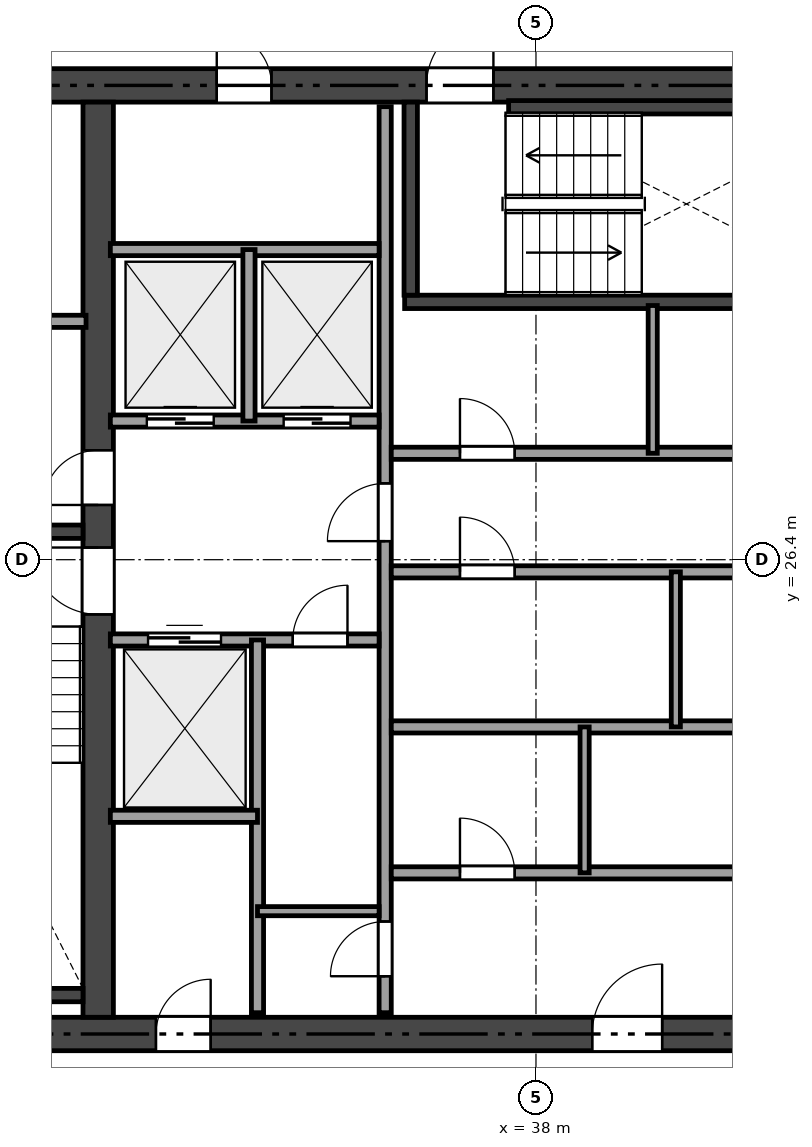
"""IFC4 building model, lengths in metres.
Left out: names, types, materials, properties, quantities, classifications, styles, units other than length and angle.
Written with IfcOpenShell. Run it as: python <this file> out.ifc"""

import sys

from ifc_helpers import new_model, si_unit, direction, frame, frame_2d, origin, place, context, subcontext, project, spatial, rectangle, extrude, element, fill, save


model = new_model("IFC4")
c1 = context("Model", 3, precision=1e-05, world=origin(), true_north=direction((0.0, 1.0)))
c2 = subcontext(c1, "Body", "Model", "MODEL_VIEW")
j1 = project(units=[si_unit("LENGTHUNIT", "METRE"), si_unit("PLANEANGLEUNIT", "RADIAN")], contexts=[c1])
p1 = place(None, origin())
s1 = spatial("IfcSite", under=j1, at=p1, CompositionType="ELEMENT")
p2 = place(p1, origin())
s2 = spatial("IfcBuilding", under=s1, at=p2, CompositionType="ELEMENT")
p3 = place(p2, frame((0.0, 0.0, 289.9)))
s3 = spatial("IfcBuildingStorey", under=s2, at=p3, CompositionType="ELEMENT", Elevation=289.9)
p4 = place(p3, frame((26.525, 18.6, 0.0), z_axis=(0.0, 0.0, 1.0), x_axis=(1.0, 0.0, 0.0)))
e1 = element("IfcWall", 1, at=p4, inside=s3, PredefinedType="SHEAR", context=c2, shape_type="SweptSolid", body=[
    extrude(rectangle(XDim=21.35, YDim=0.55, at=frame_2d((10.675, 0.0))), origin(), (0.0, 0.0, 1.0), 2.58),
])
p5 = place(p4, frame((12.4, 0.0, 0.0)))
e2 = element("IfcOpeningElement", 2, at=p5, cuts=e1, PredefinedType="OPENING", context=c2, shape_type="SweptSolid", body=[
    extrude(rectangle(XDim=1.15, YDim=2.15, at=frame_2d((0.575, 1.075))), frame((0.0, 0.285, 0.0), z_axis=(0.0, -1.0, 0.0), x_axis=(1.0, 0.0, 0.0)), (0.0, 0.0, 1.0), 0.57),
])
p6 = place(p4, frame((5.225, 0.0, 0.0)))
e3 = element("IfcOpeningElement", 3, at=p6, cuts=e1, PredefinedType="OPENING", context=c2, shape_type="SweptSolid", body=[
    extrude(rectangle(XDim=0.9, YDim=2.1, at=frame_2d((0.45, 1.05))), frame((0.0, 0.285, 0.0), z_axis=(0.0, -1.0, 0.0), x_axis=(1.0, 0.0, 0.0)), (0.0, 0.0, 1.0), 0.57),
])
p7 = place(p3, frame((26.525, 34.2, 0.0), z_axis=(0.0, 0.0, 1.0), x_axis=(1.0, 0.0, 0.0)))
e4 = element("IfcWall", 4, at=p7, inside=s3, PredefinedType="SHEAR", context=c2, shape_type="SweptSolid", body=[
    extrude(rectangle(XDim=21.35, YDim=0.55, at=frame_2d((10.675, 0.0))), origin(), (0.0, 0.0, 1.0), 2.58),
])
p8 = place(p7, frame((9.675, 0.0, 0.0)))
e5 = element("IfcOpeningElement", 5, at=p8, cuts=e4, PredefinedType="OPENING", context=c2, shape_type="SweptSolid", body=[
    extrude(rectangle(XDim=1.1, YDim=2.15, at=frame_2d((0.55, 1.075))), frame((0.0, 0.285, 0.0), z_axis=(0.0, -1.0, 0.0), x_axis=(1.0, 0.0, 0.0)), (0.0, 0.0, 1.0), 0.57),
])
p9 = place(p7, frame((1.925, 0.0, 0.0)))
e6 = element("IfcOpeningElement", 6, at=p9, cuts=e4, PredefinedType="OPENING", context=c2, shape_type="SweptSolid", body=[
    extrude(rectangle(XDim=0.9, YDim=2.1, at=frame_2d((0.45, 1.05))), frame((0.0, 0.285, 0.0), z_axis=(0.0, -1.0, 0.0), x_axis=(1.0, 0.0, 0.0)), (0.0, 0.0, 1.0), 0.57),
])
p10 = place(p7, frame((6.225, 0.0, 0.0)))
e7 = element("IfcOpeningElement", 7, at=p10, cuts=e4, PredefinedType="OPENING", context=c2, shape_type="SweptSolid", body=[
    extrude(rectangle(XDim=0.9, YDim=2.1, at=frame_2d((0.45, 1.05))), frame((0.0, 0.285, 0.0), z_axis=(0.0, -1.0, 0.0), x_axis=(1.0, 0.0, 0.0)), (0.0, 0.0, 1.0), 0.57),
])
p11 = place(p3, frame((30.8, 18.875, 0.0), z_axis=(0.0, 0.0, 1.0), x_axis=(0.0, 1.0, 0.0)))
e8 = element("IfcWall", 8, at=p11, inside=s3, PredefinedType="SHEAR", context=c2, shape_type="SweptSolid", body=[
    extrude(rectangle(XDim=15.05, YDim=0.5, at=frame_2d((7.525, 0.0))), origin(), (0.0, 0.0, 1.0), 2.58),
])
p12 = place(p11, frame((6.625, 0.0, 0.0)))
e9 = element("IfcOpeningElement", 9, at=p12, cuts=e8, PredefinedType="OPENING", context=c2, shape_type="SweptSolid", body=[
    extrude(rectangle(XDim=1.1, YDim=2.15, at=frame_2d((0.55, 1.075))), frame((0.0, 0.26, 0.0), z_axis=(0.0, -1.0, 0.0), x_axis=(1.0, 0.0, 0.0)), (0.0, 0.0, 1.0), 0.52),
])
p13 = place(p11, frame((8.425, 0.0, 0.0)))
e10 = element("IfcOpeningElement", 10, at=p13, cuts=e8, PredefinedType="OPENING", context=c2, shape_type="SweptSolid", body=[
    extrude(rectangle(XDim=0.9, YDim=2.1, at=frame_2d((0.45, 1.05))), frame((0.0, 0.26, 0.0), z_axis=(0.0, -1.0, 0.0), x_axis=(1.0, 0.0, 0.0)), (0.0, 0.0, 1.0), 0.52),
])
for number, where, z_axis, x_axis in (
    (11, (27.075, 26.86, 0.0), (0.0, 0.0, 1.0), (1.0, 0.0, 0.0)),
    (12, (27.075, 19.24, 0.0), (0.0, 0.0, 1.0), (1.0, 0.0, 0.0)),
):
    element("IfcWall", number, at=place(p3, frame(where, z_axis=z_axis, x_axis=x_axis)), inside=s3, PredefinedType="SHEAR", context=c2, shape_type="SweptSolid", body=[
        extrude(rectangle(XDim=3.475, YDim=0.22, at=frame_2d((1.738, 0.0))), origin(), (0.0, 0.0, 1.0), 2.58),
    ])
p14 = place(p3, frame((35.84, 30.64, 0.0), z_axis=(0.0, 0.0, 1.0), x_axis=(1.0, 0.0, 0.0)))
e13 = element("IfcWall", 13, at=p14, inside=s3, PredefinedType="SHEAR", context=c2, shape_type="SweptSolid", body=[
    extrude(rectangle(XDim=7.61, YDim=0.22, at=frame_2d((3.805, 0.0))), origin(), (0.0, 0.0, 1.0), 2.58),
])
p15 = place(p3, frame((35.94, 30.75, 0.0), z_axis=(0.0, 0.0, 1.0), x_axis=(0.0, 1.0, 0.0)))
e14 = element("IfcWall", 14, at=p15, inside=s3, PredefinedType="SHEAR", context=c2, shape_type="SweptSolid", body=[
    extrude(rectangle(XDim=3.175, YDim=0.22, at=frame_2d((1.587, 0.0))), origin(), (0.0, 0.0, 1.0), 2.58),
])
p16 = place(p3, frame((37.55, 33.84, 0.0), z_axis=(0.0, 0.0, 1.0), x_axis=(1.0, 0.0, 0.0)))
e15 = element("IfcWall", 15, at=p16, inside=s3, PredefinedType="SHEAR", context=c2, shape_type="SweptSolid", body=[
    extrude(rectangle(XDim=5.9, YDim=0.22, at=frame_2d((2.95, 0.0))), origin(), (0.0, 0.0, 1.0), 2.58),
])
p17 = place(p3, frame((27.15, 30.32, 0.0), z_axis=(0.0, 0.0, 1.0), x_axis=(1.0, 0.0, 0.0)))
e16 = element("IfcWall", 16, at=p17, inside=s3, PredefinedType="SOLIDWALL", context=c2, shape_type="SweptSolid", body=[
    extrude(rectangle(XDim=3.45, YDim=0.2, at=frame_2d((1.725, 0.0))), origin(), (0.0, 0.0, 1.0), 2.58),
])
p18 = place(p3, frame((35.52, 18.95, 0.0), z_axis=(0.0, 0.0, 1.0), x_axis=(0.0, 1.0, 0.0)))
e17 = element("IfcWall", 17, at=p18, inside=s3, PredefinedType="SOLIDWALL", context=c2, shape_type="SweptSolid", body=[
    extrude(rectangle(XDim=14.9, YDim=0.2, at=frame_2d((7.45, 0.0))), origin(), (0.0, 0.0, 1.0), 2.27),
])
p19 = place(p18, frame((7.755, 0.0, 0.0)))
e18 = element("IfcOpeningElement", 18, at=p19, cuts=e17, PredefinedType="OPENING", context=c2, shape_type="SweptSolid", body=[
    extrude(rectangle(XDim=0.95, YDim=2.15, at=frame_2d((0.475, 1.075))), frame((0.0, 0.11, 0.0), z_axis=(0.0, -1.0, 0.0), x_axis=(1.0, 0.0, 0.0)), (0.0, 0.0, 1.0), 0.22),
])
p20 = place(p18, frame((0.6, 0.0, 0.0)))
e19 = element("IfcOpeningElement", 19, at=p20, cuts=e17, PredefinedType="OPENING", context=c2, shape_type="SweptSolid", body=[
    extrude(rectangle(XDim=0.9, YDim=2.1, at=frame_2d((0.45, 1.05))), frame((0.0, 0.11, 0.0), z_axis=(0.0, -1.0, 0.0), x_axis=(1.0, 0.0, 0.0)), (0.0, 0.0, 1.0), 0.22),
])
p21 = place(p3, frame((31.0, 28.68, 0.0), z_axis=(0.0, 0.0, 1.0), x_axis=(1.0, 0.0, 0.0)))
e20 = element("IfcWall", 20, at=p21, inside=s3, PredefinedType="SOLIDWALL", context=c2, shape_type="SweptSolid", body=[
    extrude(rectangle(XDim=4.42, YDim=0.2, at=frame_2d((2.21, 0.0))), origin(), (0.0, 0.0, 1.0), 2.58),
])
p22 = place(p21, frame((0.6, 0.0, 0.0)))
e21 = element("IfcOpeningElement", 21, at=p22, cuts=e20, PredefinedType="OPENING", context=c2, shape_type="SweptSolid", body=[
    extrude(rectangle(XDim=1.1, YDim=2.15, at=frame_2d((0.55, 1.075))), frame((0.0, 0.11, 0.0), z_axis=(0.0, -1.0, 0.0), x_axis=(1.0, 0.0, 0.0)), (0.0, 0.0, 1.0), 0.22),
])
p23 = place(p21, frame((2.85, 0.0, 0.0)))
e22 = element("IfcOpeningElement", 22, at=p23, cuts=e20, PredefinedType="OPENING", context=c2, shape_type="SweptSolid", body=[
    extrude(rectangle(XDim=1.1, YDim=2.15, at=frame_2d((0.55, 1.075))), frame((0.0, 0.11, 0.0), z_axis=(0.0, -1.0, 0.0), x_axis=(1.0, 0.0, 0.0)), (0.0, 0.0, 1.0), 0.22),
])
p24 = place(p3, frame((31.0, 31.5, 0.0), z_axis=(0.0, 0.0, 1.0), x_axis=(1.0, 0.0, 0.0)))
e23 = element("IfcWall", 23, at=p24, inside=s3, PredefinedType="SOLIDWALL", context=c2, shape_type="SweptSolid", body=[
    extrude(rectangle(XDim=4.42, YDim=0.2, at=frame_2d((2.21, 0.0))), origin(), (0.0, 0.0, 1.0), 2.58),
])
p25 = place(p3, frame((33.28, 28.68, 0.0), z_axis=(0.0, 0.0, 1.0), x_axis=(0.0, 1.0, 0.0)))
e24 = element("IfcWall", 24, at=p25, inside=s3, PredefinedType="SOLIDWALL", context=c2, shape_type="SweptSolid", body=[
    extrude(rectangle(XDim=2.82, YDim=0.2, at=frame_2d((1.41, 0.0))), origin(), (0.0, 0.0, 1.0), 2.58),
])
p26 = place(p3, frame((31.0, 25.08, 0.0), z_axis=(0.0, 0.0, 1.0), x_axis=(1.0, 0.0, 0.0)))
e25 = element("IfcWall", 25, at=p26, inside=s3, PredefinedType="SOLIDWALL", context=c2, shape_type="SweptSolid", body=[
    extrude(rectangle(XDim=4.42, YDim=0.2, at=frame_2d((2.21, 0.0))), origin(), (0.0, 0.0, 1.0), 2.58),
])
p27 = place(p26, frame((3.0, 0.0, 0.0)))
e26 = element("IfcOpeningElement", 26, at=p27, cuts=e25, PredefinedType="OPENING", context=c2, shape_type="SweptSolid", body=[
    extrude(rectangle(XDim=0.9, YDim=2.1, at=frame_2d((0.45, 1.05))), frame((0.0, 0.11, 0.0), z_axis=(0.0, -1.0, 0.0), x_axis=(1.0, 0.0, 0.0)), (0.0, 0.0, 1.0), 0.22),
])
p28 = place(p26, frame((0.62, 0.0, 0.0)))
e27 = element("IfcOpeningElement", 27, at=p28, cuts=e25, PredefinedType="OPENING", context=c2, shape_type="SweptSolid", body=[
    extrude(rectangle(XDim=1.2, YDim=2.15, at=frame_2d((0.6, 1.075))), frame((0.0, 0.11, 0.0), z_axis=(0.0, -1.0, 0.0), x_axis=(1.0, 0.0, 0.0)), (0.0, 0.0, 1.0), 0.22),
])
p29 = place(p3, frame((33.42, 18.95, 0.0), z_axis=(0.0, 0.0, 1.0), x_axis=(0.0, 1.0, 0.0)))
e28 = element("IfcWall", 28, at=p29, inside=s3, PredefinedType="SOLIDWALL", context=c2, shape_type="SweptSolid", body=[
    extrude(rectangle(XDim=6.13, YDim=0.2, at=frame_2d((3.065, 0.0))), origin(), (0.0, 0.0, 1.0), 2.101),
])
p30 = place(p3, frame((31.0, 22.18, 0.0), z_axis=(0.0, 0.0, 1.0), x_axis=(1.0, 0.0, 0.0)))
e29 = element("IfcWall", 29, at=p30, inside=s3, PredefinedType="SOLIDWALL", context=c2, shape_type="SweptSolid", body=[
    extrude(rectangle(XDim=2.42, YDim=0.2, at=frame_2d((1.21, 0.0))), origin(), (0.0, 0.0, 1.0), 2.58),
])
p31 = place(p3, frame((33.42, 20.62, 0.0), z_axis=(0.0, 0.0, 1.0), x_axis=(1.0, 0.0, 0.0)))
e30 = element("IfcWall", 30, at=p31, inside=s3, PredefinedType="PARTITIONING", context=c2, shape_type="SweptSolid", body=[
    extrude(rectangle(XDim=2.0, YDim=0.15, at=frame_2d((1.0, 0.0))), origin(), (0.0, 0.0, 1.0), 2.58),
])
p32 = place(p3, frame((35.62, 28.15, 0.0), z_axis=(0.0, 0.0, 1.0), x_axis=(1.0, 0.0, 0.0)))
e31 = element("IfcWall", 31, at=p32, inside=s3, PredefinedType="SOLIDWALL", context=c2, shape_type="SweptSolid", body=[
    extrude(rectangle(XDim=7.88, YDim=0.2, at=frame_2d((3.94, 0.0))), origin(), (0.0, 0.0, 1.0), 2.58),
])
p33 = place(p32, frame((1.13, 0.0, 0.0)))
e32 = element("IfcOpeningElement", 32, at=p33, cuts=e31, PredefinedType="OPENING", context=c2, shape_type="SweptSolid", body=[
    extrude(rectangle(XDim=0.9, YDim=2.1, at=frame_2d((0.45, 1.05))), frame((0.0, 0.11, 0.0), z_axis=(0.0, -1.0, 0.0), x_axis=(1.0, 0.0, 0.0)), (0.0, 0.0, 1.0), 0.22),
])
p34 = place(p32, frame((5.73, 0.0, 0.0)))
e33 = element("IfcOpeningElement", 33, at=p34, cuts=e31, PredefinedType="OPENING", context=c2, shape_type="SweptSolid", body=[
    extrude(rectangle(XDim=0.9, YDim=2.1, at=frame_2d((0.45, 1.05))), frame((0.0, 0.11, 0.0), z_axis=(0.0, -1.0, 0.0), x_axis=(1.0, 0.0, 0.0)), (0.0, 0.0, 1.0), 0.22),
])
p35 = place(p3, frame((35.62, 26.2, 0.0), z_axis=(0.0, 0.0, 1.0), x_axis=(1.0, 0.0, 0.0)))
e34 = element("IfcWall", 34, at=p35, inside=s3, PredefinedType="SOLIDWALL", context=c2, shape_type="SweptSolid", body=[
    extrude(rectangle(XDim=7.88, YDim=0.2, at=frame_2d((3.94, 0.0))), origin(), (0.0, 0.0, 1.0), 2.58),
])
p36 = place(p35, frame((1.13, 0.0, 0.0)))
e35 = element("IfcOpeningElement", 35, at=p36, cuts=e34, PredefinedType="OPENING", context=c2, shape_type="SweptSolid", body=[
    extrude(rectangle(XDim=0.9, YDim=2.1, at=frame_2d((0.45, 1.05))), frame((0.0, 0.11, 0.0), z_axis=(0.0, -1.0, 0.0), x_axis=(1.0, 0.0, 0.0)), (0.0, 0.0, 1.0), 0.22),
])
p37 = place(p35, frame((5.73, 0.0, 0.0)))
e36 = element("IfcOpeningElement", 36, at=p37, cuts=e34, PredefinedType="OPENING", context=c2, shape_type="SweptSolid", body=[
    extrude(rectangle(XDim=0.9, YDim=2.1, at=frame_2d((0.45, 1.05))), frame((0.0, 0.11, 0.0), z_axis=(0.0, -1.0, 0.0), x_axis=(1.0, 0.0, 0.0)), (0.0, 0.0, 1.0), 0.22),
])
p38 = place(p3, frame((35.62, 23.65, 0.0), z_axis=(0.0, 0.0, 1.0), x_axis=(1.0, 0.0, 0.0)))
e37 = element("IfcWall", 37, at=p38, inside=s3, PredefinedType="SOLIDWALL", context=c2, shape_type="SweptSolid", body=[
    extrude(rectangle(XDim=7.88, YDim=0.2, at=frame_2d((3.94, 0.0))), origin(), (0.0, 0.0, 1.0), 2.101),
])
p39 = place(p3, frame((35.62, 21.25, 0.0), z_axis=(0.0, 0.0, 1.0), x_axis=(1.0, 0.0, 0.0)))
e38 = element("IfcWall", 38, at=p39, inside=s3, PredefinedType="SOLIDWALL", context=c2, shape_type="SweptSolid", body=[
    extrude(rectangle(XDim=7.88, YDim=0.2, at=frame_2d((3.94, 0.0))), origin(), (0.0, 0.0, 1.0), 2.58),
])
p40 = place(p39, frame((1.13, 0.0, 0.0)))
e39 = element("IfcOpeningElement", 39, at=p40, cuts=e38, PredefinedType="OPENING", context=c2, shape_type="SweptSolid", body=[
    extrude(rectangle(XDim=0.9, YDim=2.1, at=frame_2d((0.45, 1.05))), frame((0.0, 0.11, 0.0), z_axis=(0.0, -1.0, 0.0), x_axis=(1.0, 0.0, 0.0)), (0.0, 0.0, 1.0), 0.22),
])
p41 = place(p39, frame((5.73, 0.0, 0.0)))
e40 = element("IfcOpeningElement", 40, at=p41, cuts=e38, PredefinedType="OPENING", context=c2, shape_type="SweptSolid", body=[
    extrude(rectangle(XDim=0.9, YDim=2.1, at=frame_2d((0.45, 1.05))), frame((0.0, 0.11, 0.0), z_axis=(0.0, -1.0, 0.0), x_axis=(1.0, 0.0, 0.0)), (0.0, 0.0, 1.0), 0.22),
])
p42 = place(p3, frame((39.92, 28.15, 0.0), z_axis=(0.0, 0.0, 1.0), x_axis=(0.0, 1.0, 0.0)))
e41 = element("IfcWall", 41, at=p42, inside=s3, PredefinedType="PARTITIONING", context=c2, shape_type="SweptSolid", body=[
    extrude(rectangle(XDim=2.43, YDim=0.15, at=frame_2d((1.215, 0.0))), origin(), (0.0, 0.0, 1.0), 2.58),
])
p43 = place(p3, frame((40.3, 23.65, 0.0), z_axis=(0.0, 0.0, 1.0), x_axis=(0.0, 1.0, 0.0)))
e42 = element("IfcWall", 42, at=p43, inside=s3, PredefinedType="PARTITIONING", context=c2, shape_type="SweptSolid", body=[
    extrude(rectangle(XDim=2.55, YDim=0.15, at=frame_2d((1.275, 0.0))), origin(), (0.0, 0.0, 1.0), 2.101),
])
p44 = place(p3, frame((38.8, 21.25, 0.0), z_axis=(0.0, 0.0, 1.0), x_axis=(0.0, 1.0, 0.0)))
e43 = element("IfcWall", 43, at=p44, inside=s3, PredefinedType="PARTITIONING", context=c2, shape_type="SweptSolid", body=[
    extrude(rectangle(XDim=2.4, YDim=0.15, at=frame_2d((1.2, 0.0))), origin(), (0.0, 0.0, 1.0), 2.101),
])
p45 = place(p12, origin())
e44 = element("IfcDoor", 44, at=p45, inside=s3, OperationType="SINGLE_SWING_RIGHT", PredefinedType="DOOR", context=c2, shape_type="SweptSolid", body=[
    extrude(rectangle(XDim=1.1, YDim=2.15, at=frame_2d((0.55, 1.075))), frame((0.0, 0.025, 0.0), z_axis=(0.0, -1.0, 0.0), x_axis=(1.0, 0.0, 0.0)), (0.0, 0.0, 1.0), 0.05),
])
fill(e9, e44)
p46 = place(p8, origin())
e45 = element("IfcDoor", 45, at=p46, inside=s3, OperationType="SINGLE_SWING_RIGHT", PredefinedType="DOOR", context=c2, shape_type="SweptSolid", body=[
    extrude(rectangle(XDim=1.1, YDim=2.15, at=frame_2d((0.55, 1.075))), frame((0.0, 0.025, 0.0), z_axis=(0.0, -1.0, 0.0), x_axis=(1.0, 0.0, 0.0)), (0.0, 0.0, 1.0), 0.05),
])
fill(e5, e45)
p47 = place(p19, origin())
e46 = element("IfcDoor", 46, at=p47, inside=s3, OperationType="SINGLE_SWING_LEFT", PredefinedType="DOOR", context=c2, shape_type="SweptSolid", body=[
    extrude(rectangle(XDim=0.95, YDim=2.15, at=frame_2d((0.475, 1.075))), frame((0.0, 0.025, 0.0), z_axis=(0.0, -1.0, 0.0), x_axis=(1.0, 0.0, 0.0)), (0.0, 0.0, 1.0), 0.05),
])
fill(e18, e46)
p48 = place(p5, origin())
e47 = element("IfcDoor", 47, at=p48, inside=s3, OperationType="SINGLE_SWING_RIGHT", PredefinedType="DOOR", context=c2, shape_type="SweptSolid", body=[
    extrude(rectangle(XDim=1.15, YDim=2.15, at=frame_2d((0.575, 1.075))), frame((0.0, 0.025, 0.0), z_axis=(0.0, -1.0, 0.0), x_axis=(1.0, 0.0, 0.0)), (0.0, 0.0, 1.0), 0.05),
])
fill(e2, e47)
p49 = place(p13, origin())
e48 = element("IfcDoor", 48, at=p49, inside=s3, OperationType="SINGLE_SWING_LEFT", PredefinedType="DOOR", context=c2, shape_type="SweptSolid", body=[
    extrude(rectangle(XDim=0.9, YDim=2.1, at=frame_2d((0.45, 1.05))), frame((0.0, 0.025, 0.0), z_axis=(0.0, -1.0, 0.0), x_axis=(1.0, 0.0, 0.0)), (0.0, 0.0, 1.0), 0.05),
])
fill(e10, e48)
p50 = place(p10, origin())
e49 = element("IfcDoor", 49, at=p50, inside=s3, OperationType="SINGLE_SWING_LEFT", PredefinedType="DOOR", context=c2, shape_type="SweptSolid", body=[
    extrude(rectangle(XDim=0.9, YDim=2.1, at=frame_2d((0.45, 1.05))), frame((0.0, 0.025, 0.0), z_axis=(0.0, -1.0, 0.0), x_axis=(1.0, 0.0, 0.0)), (0.0, 0.0, 1.0), 0.05),
])
fill(e7, e49)
p51 = place(p6, origin())
e50 = element("IfcDoor", 50, at=p51, inside=s3, OperationType="SINGLE_SWING_RIGHT", PredefinedType="DOOR", context=c2, shape_type="SweptSolid", body=[
    extrude(rectangle(XDim=0.9, YDim=2.1, at=frame_2d((0.45, 1.05))), frame((0.0, 0.025, 0.0), z_axis=(0.0, -1.0, 0.0), x_axis=(1.0, 0.0, 0.0)), (0.0, 0.0, 1.0), 0.05),
])
fill(e3, e50)
p52 = place(p20, origin())
e51 = element("IfcDoor", 51, at=p52, inside=s3, OperationType="SINGLE_SWING_LEFT", PredefinedType="DOOR", context=c2, shape_type="SweptSolid", body=[
    extrude(rectangle(XDim=0.9, YDim=2.1, at=frame_2d((0.45, 1.05))), frame((0.0, 0.025, 0.0), z_axis=(0.0, -1.0, 0.0), x_axis=(1.0, 0.0, 0.0)), (0.0, 0.0, 1.0), 0.05),
])
fill(e19, e51)
p53 = place(p27, origin())
e52 = element("IfcDoor", 52, at=p53, inside=s3, OperationType="SINGLE_SWING_RIGHT", PredefinedType="DOOR", context=c2, shape_type="SweptSolid", body=[
    extrude(rectangle(XDim=0.9, YDim=2.1, at=frame_2d((0.45, 1.05))), frame((0.0, 0.025, 0.0), z_axis=(0.0, -1.0, 0.0), x_axis=(1.0, 0.0, 0.0)), (0.0, 0.0, 1.0), 0.05),
])
fill(e26, e52)
p54 = place(p40, origin())
e53 = element("IfcDoor", 53, at=p54, inside=s3, OperationType="SINGLE_SWING_LEFT", PredefinedType="DOOR", context=c2, shape_type="SweptSolid", body=[
    extrude(rectangle(XDim=0.9, YDim=2.1, at=frame_2d((0.45, 1.05))), frame((0.0, 0.025, 0.0), z_axis=(0.0, -1.0, 0.0), x_axis=(1.0, 0.0, 0.0)), (0.0, 0.0, 1.0), 0.05),
])
fill(e39, e53)
p55 = place(p36, origin())
e54 = element("IfcDoor", 54, at=p55, inside=s3, OperationType="SINGLE_SWING_LEFT", PredefinedType="DOOR", context=c2, shape_type="SweptSolid", body=[
    extrude(rectangle(XDim=0.9, YDim=2.1, at=frame_2d((0.45, 1.05))), frame((0.0, 0.025, 0.0), z_axis=(0.0, -1.0, 0.0), x_axis=(1.0, 0.0, 0.0)), (0.0, 0.0, 1.0), 0.05),
])
fill(e35, e54)
p56 = place(p33, origin())
e55 = element("IfcDoor", 55, at=p56, inside=s3, OperationType="SINGLE_SWING_LEFT", PredefinedType="DOOR", context=c2, shape_type="SweptSolid", body=[
    extrude(rectangle(XDim=0.9, YDim=2.1, at=frame_2d((0.45, 1.05))), frame((0.0, 0.025, 0.0), z_axis=(0.0, -1.0, 0.0), x_axis=(1.0, 0.0, 0.0)), (0.0, 0.0, 1.0), 0.05),
])
fill(e32, e55)
p57 = place(p22, origin())
e56 = element("IfcDoor", 56, at=p57, inside=s3, OperationType="SLIDING_TO_LEFT", PredefinedType="DOOR", context=c2, shape_type="SweptSolid", body=[
    extrude(rectangle(XDim=1.1, YDim=2.15, at=frame_2d((0.55, 1.075))), frame((0.0, 0.025, 0.0), z_axis=(0.0, -1.0, 0.0), x_axis=(1.0, 0.0, 0.0)), (0.0, 0.0, 1.0), 0.05),
])
fill(e21, e56)
p58 = place(p23, origin())
e57 = element("IfcDoor", 57, at=p58, inside=s3, OperationType="SLIDING_TO_LEFT", PredefinedType="DOOR", context=c2, shape_type="SweptSolid", body=[
    extrude(rectangle(XDim=1.1, YDim=2.15, at=frame_2d((0.55, 1.075))), frame((0.0, 0.025, 0.0), z_axis=(0.0, -1.0, 0.0), x_axis=(1.0, 0.0, 0.0)), (0.0, 0.0, 1.0), 0.05),
])
fill(e22, e57)
p59 = place(p28, origin())
e58 = element("IfcDoor", 58, at=p59, inside=s3, OperationType="SLIDING_TO_LEFT", PredefinedType="DOOR", context=c2, shape_type="SweptSolid", body=[
    extrude(rectangle(XDim=1.2, YDim=2.15, at=frame_2d((0.6, 1.075))), frame((0.0, 0.025, 0.0), z_axis=(0.0, -1.0, 0.0), x_axis=(1.0, 0.0, 0.0)), (0.0, 0.0, 1.0), 0.05),
])
fill(e27, e58)
save(model, sys.argv[1])
